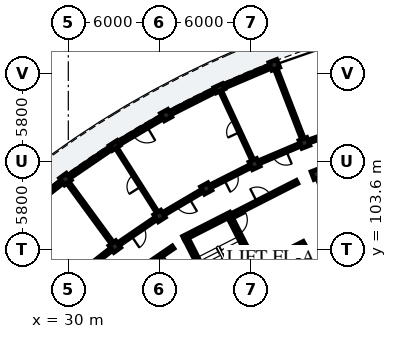
"""IFC4 building model, lengths in metres.
Left out: names, types, materials, properties, quantities, classifications, styles, units other than length and angle.
Written with IfcOpenShell. Run it as: python <this file> out.ifc"""

import sys

from ifc_helpers import new_model, si_unit, direction, frame, frame_2d, origin, origin_2d, place, context, subcontext, project, spatial, rectangle, extrude, element, fill, save


model = new_model("IFC4")
c1 = context("Model", 3, precision=1e-05, world=origin(), true_north=direction((0.0, 1.0)))
c2 = subcontext(c1, "Body", "Model", "MODEL_VIEW")
j1 = project(units=[si_unit("LENGTHUNIT", "METRE"), si_unit("PLANEANGLEUNIT", "RADIAN")], contexts=[c1])
p1 = place(None, origin())
s1 = spatial("IfcSite", under=j1, at=p1, CompositionType="ELEMENT")
p2 = place(p1, origin())
s2 = spatial("IfcBuilding", under=s1, at=p2, CompositionType="ELEMENT")
p3 = place(p2, frame((0.0, 0.0, 22.28)))
s3 = spatial("IfcBuildingStorey", under=s2, at=p3, CompositionType="ELEMENT", Elevation=22.28)
p4 = place(p3, frame((37.773, 104.296, 0.0), z_axis=(0.0, 0.0, 1.0), x_axis=(0.453992276384, -0.891005618941, 0.0)))
e1 = element("IfcWall", 1, at=p4, inside=s3, PredefinedType="SHEAR", context=c2, shape_type="SweptSolid", body=[
    extrude(rectangle(XDim=6.6, YDim=0.28, at=frame_2d((3.3, 0.0))), origin(), (0.0, 0.0, 1.0), 3.11),
])
p5 = place(p3, frame((37.585, 104.357, 0.0), z_axis=(0.0, 0.0, 1.0), x_axis=(0.891020222667, 0.453963613958, 0.0)))
e2 = element("IfcWall", 2, at=p5, inside=s3, PredefinedType="SHEAR", context=c2, shape_type="SweptSolid", body=[
    extrude(rectangle(XDim=3.48, YDim=0.28, at=frame_2d((1.74, 0.0))), origin(), (0.0, 0.0, 1.0), 3.11),
])
p6 = place(p3, frame((40.625, 105.748, 0.0), z_axis=(0.0, 0.0, 1.0), x_axis=(0.453992276384, -0.891005618941, 0.0)))
e3 = element("IfcWall", 3, at=p6, inside=s3, PredefinedType="SHEAR", context=c2, shape_type="SweptSolid", body=[
    extrude(rectangle(XDim=6.6, YDim=0.28, at=frame_2d((3.3, 0.0))), origin(), (0.0, 0.0, 1.0), 3.11),
])
p7 = place(p6, frame((0.22, 0.0, 0.0)))
e4 = element("IfcOpeningElement", 4, at=p7, cuts=e3, PredefinedType="OPENING", context=c2, shape_type="SweptSolid", body=[
    extrude(rectangle(XDim=1.05, YDim=2.15, at=frame_2d((0.525, 1.075))), frame((0.0, 0.15, 0.0), z_axis=(0.0, -1.0, 0.0), x_axis=(1.0, 0.0, 0.0)), (0.0, 0.0, 1.0), 0.3),
])
p8 = place(p3, frame((42.597, 102.561, 0.0), z_axis=(0.0, 0.0, 1.0), x_axis=(0.891001200497, 0.454000947921, 0.0)))
e5 = element("IfcWall", 5, at=p8, inside=s3, PredefinedType="SHEAR", context=c2, shape_type="SweptSolid", body=[
    extrude(rectangle(XDim=3.26, YDim=0.23, at=frame_2d((1.63, 0.0))), origin(), (0.0, 0.0, 1.0), 3.11),
])
p9 = place(p8, frame((0.9, 0.0, 0.0)))
e6 = element("IfcOpeningElement", 6, at=p9, cuts=e5, PredefinedType="OPENING", context=c2, shape_type="SweptSolid", body=[
    extrude(rectangle(XDim=1.1, YDim=2.15, at=frame_2d((0.55, 1.075))), frame((0.0, 0.125, 0.0), z_axis=(0.0, -1.0, 0.0), x_axis=(1.0, 0.0, 0.0)), (0.0, 0.0, 1.0), 0.25),
])
p10 = place(p3, frame((45.451, 103.886, 0.0), z_axis=(0.0, 0.0, 1.0), x_axis=(0.454000278178, -0.891001541758, 0.0)))
e7 = element("IfcWall", 7, at=p10, inside=s3, PredefinedType="SHEAR", context=c2, shape_type="SweptSolid", body=[
    extrude(rectangle(XDim=2.7, YDim=0.23, at=frame_2d((1.35, 0.0))), origin(), (0.0, 0.0, 1.0), 3.11),
])
for number, where, z_axis, x_axis in (
    (8, (46.325, 108.57, 0.0), (0.0, 0.0, 1.0), (-0.36, 0.933, 0.0)),
    (9, (45.532, 110.622, 0.0), (0.0, 0.0, 1.0), (-0.36, 0.933, 0.0)),
    (10, (43.552, 115.753, 0.0), (0.0, 0.0, 1.0), (-0.36, 0.933, 0.0)),
    (11, (42.252, 109.23, 0.0), (0.0, 0.0, 1.0), (-0.421, 0.907, 0.0)),
):
    element("IfcColumn", number, at=place(p3, frame(where, z_axis=z_axis, x_axis=x_axis)), inside=s3, PredefinedType="COLUMN", context=c2, shape_type="SweptSolid", body=[
        extrude(rectangle(XDim=0.55, YDim=0.55, at=origin_2d()), origin(), (0.0, 0.0, 1.0), 3.11),
    ])
p11 = place(p3, frame((39.938, 114.219, 0.0), z_axis=(0.0, 0.0, 1.0), x_axis=(-0.420859924104, 0.907125638643, 0.0)))
e12 = element("IfcColumn", 12, at=p11, inside=s3, PredefinedType="PILASTER", context=c2, shape_type="SweptSolid", body=[
    extrude(rectangle(XDim=0.38, YDim=0.62, at=origin_2d()), origin(), (0.0, 0.0, 1.0), 3.11),
])
for number, where, z_axis, x_axis in (
    (13, (39.072, 107.625, 0.0), (0.0, 0.0, 1.0), (-0.48, 0.877, 0.0)),
    (14, (36.433, 112.451, 0.0), (0.0, 0.0, 1.0), (-0.48, 0.877, 0.0)),
    (15, (36.003, 105.813, 0.0), (0.0, 0.0, 1.0), (-0.536, 0.844, 0.0)),
):
    element("IfcColumn", number, at=place(p3, frame(where, z_axis=z_axis, x_axis=x_axis)), inside=s3, PredefinedType="COLUMN", context=c2, shape_type="SweptSolid", body=[
        extrude(rectangle(XDim=0.55, YDim=0.55, at=origin_2d()), origin(), (0.0, 0.0, 1.0), 3.11),
    ])
p12 = place(p3, frame((33.052, 110.455, 0.0), z_axis=(0.0, 0.0, 1.0), x_axis=(-0.536481603385, 0.843912015099, 0.0)))
e16 = element("IfcColumn", 16, at=p12, inside=s3, PredefinedType="PILASTER", context=c2, shape_type="SweptSolid", body=[
    extrude(rectangle(XDim=0.38, YDim=0.62, at=origin_2d()), origin(), (0.0, 0.0, 1.0), 3.11),
])
for number, where, z_axis, x_axis in (
    (17, (33.061, 103.804, 0.0), (0.0, 0.0, 1.0), (-0.591, 0.807, 0.0)),
    (18, (29.811, 108.241, 0.0), (0.0, 0.0, 1.0), (-0.591, 0.807, 0.0)),
):
    element("IfcColumn", number, at=place(p3, frame(where, z_axis=z_axis, x_axis=x_axis)), inside=s3, PredefinedType="COLUMN", context=c2, shape_type="SweptSolid", body=[
        extrude(rectangle(XDim=0.55, YDim=0.55, at=origin_2d()), origin(), (0.0, 0.0, 1.0), 3.11),
    ])
p13 = place(p3, frame((43.326, 115.657, 0.0), z_axis=(0.0, 0.0, 1.0), x_axis=(-0.920502438884, -0.390736816807, 0.0)))
e19 = element("IfcWall", 19, at=p13, inside=s3, PredefinedType="SOLIDWALL", context=c2, shape_type="SweptSolid", body=[
    extrude(rectangle(XDim=3.521, YDim=0.245, at=frame_2d((1.76, 0.0))), origin(), (0.0, 0.0, 1.0), 2.355),
])
p14 = place(p13, frame((1.02, 0.0, 0.55)))
e20 = element("IfcOpeningElement", 20, at=p14, cuts=e19, PredefinedType="OPENING", context=c2, shape_type="SweptSolid", body=[
    extrude(rectangle(XDim=1.48, YDim=1.62, at=frame_2d((0.74, 0.81))), frame((0.0, 0.133, 0.0), z_axis=(0.0, -1.0, 0.0), x_axis=(1.0, 0.0, 0.0)), (0.0, 0.0, 1.0), 0.265),
])
p15 = place(p3, frame((39.795, 114.147, 0.0), z_axis=(0.0, 0.0, 1.0), x_axis=(-0.892756700232, -0.450539092855, 0.0)))
e21 = element("IfcWall", 21, at=p15, inside=s3, PredefinedType="SOLIDWALL", context=c2, shape_type="SweptSolid", body=[
    extrude(rectangle(XDim=3.521, YDim=0.245, at=frame_2d((1.76, 0.0))), origin(), (0.0, 0.0, 1.0), 2.355),
])
p16 = place(p15, frame((1.16, 0.0, 0.55)))
e22 = element("IfcOpeningElement", 22, at=p16, cuts=e21, PredefinedType="OPENING", context=c2, shape_type="SweptSolid", body=[
    extrude(rectangle(XDim=1.2, YDim=1.51, at=frame_2d((0.6, 0.755))), frame((0.0, 0.133, 0.0), z_axis=(0.0, -1.0, 0.0), x_axis=(1.0, 0.0, 0.0)), (0.0, 0.0, 1.0), 0.265),
])
p17 = place(p3, frame((36.222, 112.326, 0.0), z_axis=(0.0, 0.0, 1.0), x_axis=(-0.861154218161, -0.50834379365, 0.0)))
e23 = element("IfcWall", 23, at=p17, inside=s3, PredefinedType="SOLIDWALL", context=c2, shape_type="SweptSolid", body=[
    extrude(rectangle(XDim=3.521, YDim=0.245, at=frame_2d((1.76, 0.0))), origin(), (0.0, 0.0, 1.0), 2.355),
])
p18 = place(p17, frame((1.22, 0.0, 0.0)))
e24 = element("IfcOpeningElement", 24, at=p18, cuts=e23, PredefinedType="OPENING", context=c2, shape_type="SweptSolid", body=[
    extrude(rectangle(XDim=1.08, YDim=2.15, at=frame_2d((0.54, 1.075))), frame((0.0, 0.133, 0.0), z_axis=(0.0, -1.0, 0.0), x_axis=(1.0, 0.0, 0.0)), (0.0, 0.0, 1.0), 0.265),
])
p19 = place(p3, frame((32.92, 110.365, 0.0), z_axis=(0.0, 0.0, 1.0), x_axis=(-0.825745840472, -0.56404238045, 0.0)))
e25 = element("IfcWall", 25, at=p19, inside=s3, PredefinedType="SOLIDWALL", context=c2, shape_type="SweptSolid", body=[
    extrude(rectangle(XDim=3.521, YDim=0.245, at=frame_2d((1.76, 0.0))), origin(), (0.0, 0.0, 1.0), 2.355),
])
p20 = place(p19, frame((1.04, 0.0, 0.35)))
e26 = element("IfcOpeningElement", 26, at=p20, cuts=e25, PredefinedType="OPENING", context=c2, shape_type="SweptSolid", body=[
    extrude(rectangle(XDim=1.44, YDim=1.66, at=frame_2d((0.72, 0.83))), frame((0.0, 0.133, 0.0), z_axis=(0.0, -1.0, 0.0), x_axis=(1.0, 0.0, 0.0)), (0.0, 0.0, 1.0), 0.265),
])
p21 = place(p3, frame((29.618, 108.09, 0.0), z_axis=(0.0, 0.0, 1.0), x_axis=(-0.786813798172, -0.617190446301, 0.0)))
e27 = element("IfcWall", 27, at=p21, inside=s3, PredefinedType="SOLIDWALL", context=c2, shape_type="SweptSolid", body=[
    extrude(rectangle(XDim=3.521, YDim=0.245, at=frame_2d((1.76, 0.0))), origin(), (0.0, 0.0, 1.0), 2.355),
])
p22 = place(p21, frame((0.98, 0.0, 0.55)))
e28 = element("IfcOpeningElement", 28, at=p22, cuts=e27, PredefinedType="OPENING", context=c2, shape_type="SweptSolid", body=[
    extrude(rectangle(XDim=1.56, YDim=1.51, at=frame_2d((0.78, 0.755))), frame((0.0, 0.133, 0.0), z_axis=(0.0, -1.0, 0.0), x_axis=(1.0, 0.0, 0.0)), (0.0, 0.0, 1.0), 0.265),
])
p23 = place(p3, frame((40.682, 105.834, 0.0), z_axis=(0.0, 0.0, 1.0), x_axis=(0.891003372311, 0.453996685595, 0.0)))
e29 = element("IfcWall", 29, at=p23, inside=s3, PredefinedType="PARTITIONING", context=c2, shape_type="SweptSolid", body=[
    extrude(rectangle(XDim=4.9, YDim=0.22, at=frame_2d((2.45, 0.0))), origin(), (0.0, 0.0, 1.0), 2.34),
])
p24 = place(p23, frame((1.95, 0.0, 0.0)))
e30 = element("IfcOpeningElement", 30, at=p24, cuts=e29, PredefinedType="OPENING", context=c2, shape_type="SweptSolid", body=[
    extrude(rectangle(XDim=1.0, YDim=2.15, at=frame_2d((0.5, 1.075))), frame((0.0, 0.12, 0.0), z_axis=(0.0, -1.0, 0.0), x_axis=(1.0, 0.0, 0.0)), (0.0, 0.0, 1.0), 0.24),
])
p25 = place(p3, frame((48.566, 111.68, 0.0), z_axis=(0.0, 0.0, 1.0), x_axis=(-0.944253820929, -0.329218349522, 0.0)))
e31 = element("IfcWall", 31, at=p25, inside=s3, PredefinedType="PARTITIONING", context=c2, shape_type="SweptSolid", body=[
    extrude(rectangle(XDim=2.863, YDim=0.205, at=frame_2d((1.432, 0.0))), origin(), (0.0, 0.0, 1.0), 2.37),
])
p26 = place(p25, frame((0.947, 0.0, 0.0)))
e32 = element("IfcOpeningElement", 32, at=p26, cuts=e31, PredefinedType="OPENING", context=c2, shape_type="SweptSolid", body=[
    extrude(rectangle(XDim=0.97, YDim=2.15, at=frame_2d((0.485, 1.075))), frame((0.0, 0.113, 0.0), z_axis=(0.0, -1.0, 0.0), x_axis=(1.0, 0.0, 0.0)), (0.0, 0.0, 1.0), 0.225),
])
p27 = place(p3, frame((45.388, 110.996, 0.0), z_axis=(0.0, 0.0, 1.0), x_axis=(-0.360186633854, 0.932880264982, 0.0)))
e33 = element("IfcWall", 33, at=p27, inside=s3, PredefinedType="PARTITIONING", context=c2, shape_type="SweptSolid", body=[
    extrude(rectangle(XDim=4.7, YDim=0.185, at=frame_2d((2.35, 0.0))), origin(), (0.0, 0.0, 1.0), 2.37),
])
p28 = place(p3, frame((45.21, 110.486, 0.0), z_axis=(0.0, 0.0, 1.0), x_axis=(-0.920511160294, -0.390716270168, 0.0)))
e34 = element("IfcWall", 34, at=p28, inside=s3, PredefinedType="PARTITIONING", context=c2, shape_type="SweptSolid", body=[
    extrude(rectangle(XDim=2.863, YDim=0.205, at=frame_2d((1.432, 0.0))), origin(), (0.0, 0.0, 1.0), 2.37),
])
p29 = place(p28, frame((0.957, 0.0, 0.0)))
e35 = element("IfcOpeningElement", 35, at=p29, cuts=e34, PredefinedType="OPENING", context=c2, shape_type="SweptSolid", body=[
    extrude(rectangle(XDim=0.95, YDim=2.13, at=frame_2d((0.475, 1.065))), frame((0.0, 0.113, 0.0), z_axis=(0.0, -1.0, 0.0), x_axis=(1.0, 0.0, 0.0)), (0.0, 0.0, 1.0), 0.225),
])
p30 = place(p3, frame((42.084, 109.593, 0.0), z_axis=(0.0, 0.0, 1.0), x_axis=(-0.420862519045, 0.907124434718, 0.0)))
e36 = element("IfcWall", 36, at=p30, inside=s3, PredefinedType="PLUMBINGWALL", context=c2, shape_type="SweptSolid", body=[
    extrude(rectangle(XDim=4.7, YDim=0.14, at=frame_2d((2.35, 0.0))), origin(), (0.0, 0.0, 1.0), 2.37),
])
p31 = place(p30, frame((1.92, 0.0, 0.0)))
e37 = element("IfcOpeningElement", 37, at=p31, cuts=e36, PredefinedType="OPENING", context=c2, shape_type="SweptSolid", body=[
    extrude(rectangle(XDim=0.86, YDim=2.06, at=frame_2d((0.43, 1.03))), frame((0.0, 0.08, 0.0), z_axis=(0.0, -1.0, 0.0), x_axis=(1.0, 0.0, 0.0)), (0.0, 0.0, 1.0), 0.16),
])
p32 = place(p3, frame((41.94, 109.073, 0.0), z_axis=(0.0, 0.0, 1.0), x_axis=(-0.89273239336, -0.450587254419, 0.0)))
e38 = element("IfcWall", 38, at=p32, inside=s3, PredefinedType="PARTITIONING", context=c2, shape_type="SweptSolid", body=[
    extrude(rectangle(XDim=2.863, YDim=0.205, at=frame_2d((1.432, 0.0))), origin(), (0.0, 0.0, 1.0), 2.37),
])
p33 = place(p32, frame((0.967, 0.0, 0.0)))
e39 = element("IfcOpeningElement", 39, at=p33, cuts=e38, PredefinedType="OPENING", context=c2, shape_type="SweptSolid", body=[
    extrude(rectangle(XDim=0.93, YDim=2.12, at=frame_2d((0.465, 1.06))), frame((0.0, 0.113, 0.0), z_axis=(0.0, -1.0, 0.0), x_axis=(1.0, 0.0, 0.0)), (0.0, 0.0, 1.0), 0.225),
])
p34 = place(p3, frame((38.77, 107.447, 0.0), z_axis=(0.0, 0.0, 1.0), x_axis=(-0.861113214678, -0.508413248753, 0.0)))
e40 = element("IfcWall", 40, at=p34, inside=s3, PredefinedType="PARTITIONING", context=c2, shape_type="SweptSolid", body=[
    extrude(rectangle(XDim=2.863, YDim=0.205, at=frame_2d((1.432, 0.0))), origin(), (0.0, 0.0, 1.0), 2.37),
])
p35 = place(p34, frame((0.937, 0.0, 0.0)))
e41 = element("IfcOpeningElement", 41, at=p35, cuts=e40, PredefinedType="OPENING", context=c2, shape_type="SweptSolid", body=[
    extrude(rectangle(XDim=0.99, YDim=2.16, at=frame_2d((0.495, 1.08))), frame((0.0, 0.113, 0.0), z_axis=(0.0, -1.0, 0.0), x_axis=(1.0, 0.0, 0.0)), (0.0, 0.0, 1.0), 0.225),
])
p36 = place(p3, frame((35.789, 106.151, 0.0), z_axis=(0.0, 0.0, 1.0), x_axis=(-0.536492262982, 0.843905238614, 0.0)))
e42 = element("IfcWall", 42, at=p36, inside=s3, PredefinedType="PARTITIONING", context=c2, shape_type="SweptSolid", body=[
    extrude(rectangle(XDim=4.7, YDim=0.125, at=frame_2d((2.35, 0.0))), origin(), (0.0, 0.0, 1.0), 2.37),
])
p37 = place(p36, frame((1.895, 0.0, 0.0)))
e43 = element("IfcOpeningElement", 43, at=p37, cuts=e42, PredefinedType="OPENING", context=c2, shape_type="SweptSolid", body=[
    extrude(rectangle(XDim=0.91, YDim=2.1, at=frame_2d((0.455, 1.05))), frame((0.0, 0.073, 0.0), z_axis=(0.0, -1.0, 0.0), x_axis=(1.0, 0.0, 0.0)), (0.0, 0.0, 1.0), 0.145),
])
p38 = place(p3, frame((35.714, 105.616, 0.0), z_axis=(0.0, 0.0, 1.0), x_axis=(-0.825779671787, -0.563992848947, 0.0)))
e44 = element("IfcWall", 44, at=p38, inside=s3, PredefinedType="PARTITIONING", context=c2, shape_type="SweptSolid", body=[
    extrude(rectangle(XDim=2.863, YDim=0.205, at=frame_2d((1.432, 0.0))), origin(), (0.0, 0.0, 1.0), 2.37),
])
p39 = place(p38, frame((0.947, 0.0, 0.0)))
e45 = element("IfcOpeningElement", 45, at=p39, cuts=e44, PredefinedType="OPENING", context=c2, shape_type="SweptSolid", body=[
    extrude(rectangle(XDim=0.97, YDim=2.15, at=frame_2d((0.485, 1.075))), frame((0.0, 0.113, 0.0), z_axis=(0.0, -1.0, 0.0), x_axis=(1.0, 0.0, 0.0)), (0.0, 0.0, 1.0), 0.225),
])
p40 = place(p3, frame((36.895, 103.76, 0.0), z_axis=(0.0, 0.0, 1.0), x_axis=(-0.825752009056, -0.56403334967, 0.0)))
e46 = element("IfcWall", 46, at=p40, inside=s3, PredefinedType="PARTITIONING", context=c2, shape_type="SweptSolid", body=[
    extrude(rectangle(XDim=2.718, YDim=0.205, at=frame_2d((1.359, 0.0))), origin(), (0.0, 0.0, 1.0), 2.37),
])
p41 = place(p40, frame((0.874, 0.0, 0.0)))
e47 = element("IfcOpeningElement", 47, at=p41, cuts=e46, PredefinedType="OPENING", context=c2, shape_type="SweptSolid", body=[
    extrude(rectangle(XDim=0.97, YDim=2.15, at=frame_2d((0.485, 1.075))), frame((0.0, 0.113, 0.0), z_axis=(0.0, -1.0, 0.0), x_axis=(1.0, 0.0, 0.0)), (0.0, 0.0, 1.0), 0.225),
])
p42 = place(p3, frame((32.824, 104.126, 0.0), z_axis=(0.0, 0.0, 1.0), x_axis=(-0.590910940129, 0.806736797745, 0.0)))
e48 = element("IfcWall", 48, at=p42, inside=s3, PredefinedType="PARTITIONING", context=c2, shape_type="SweptSolid", body=[
    extrude(rectangle(XDim=4.7, YDim=0.185, at=frame_2d((2.35, 0.0))), origin(), (0.0, 0.0, 1.0), 2.37),
])
p43 = place(p3, frame((32.785, 103.588, 0.0), z_axis=(0.0, 0.0, 1.0), x_axis=(-0.786806323554, -0.617199975061, 0.0)))
e49 = element("IfcWall", 49, at=p43, inside=s3, PredefinedType="PARTITIONING", context=c2, shape_type="SweptSolid", body=[
    extrude(rectangle(XDim=2.863, YDim=0.205, at=frame_2d((1.432, 0.0))), origin(), (0.0, 0.0, 1.0), 2.37),
])
p44 = place(p43, frame((0.957, 0.0, 0.0)))
e50 = element("IfcOpeningElement", 50, at=p44, cuts=e49, PredefinedType="OPENING", context=c2, shape_type="SweptSolid", body=[
    extrude(rectangle(XDim=0.95, YDim=2.13, at=frame_2d((0.475, 1.065))), frame((0.0, 0.113, 0.0), z_axis=(0.0, -1.0, 0.0), x_axis=(1.0, 0.0, 0.0)), (0.0, 0.0, 1.0), 0.225),
])
p45 = place(p14, origin())
e51 = element("IfcWindow", 51, at=p45, inside=s3, PartitioningType="SINGLE_PANEL", PredefinedType="WINDOW", context=c2, shape_type="SweptSolid", body=[
    extrude(rectangle(XDim=1.48, YDim=1.62, at=frame_2d((0.74, 0.81))), frame((0.0, 0.03, 0.0), z_axis=(0.0, -1.0, 0.0), x_axis=(1.0, 0.0, 0.0)), (0.0, 0.0, 1.0), 0.06),
])
fill(e20, e51)
p46 = place(p16, origin())
e52 = element("IfcWindow", 52, at=p46, inside=s3, PartitioningType="SINGLE_PANEL", PredefinedType="WINDOW", context=c2, shape_type="SweptSolid", body=[
    extrude(rectangle(XDim=1.2, YDim=1.51, at=frame_2d((0.6, 0.755))), frame((0.0, 0.03, 0.0), z_axis=(0.0, -1.0, 0.0), x_axis=(1.0, 0.0, 0.0)), (0.0, 0.0, 1.0), 0.06),
])
fill(e22, e52)
p47 = place(p18, origin())
e53 = element("IfcDoor", 53, at=p47, inside=s3, OperationType="SINGLE_SWING_LEFT", PredefinedType="DOOR", context=c2, shape_type="SweptSolid", body=[
    extrude(rectangle(XDim=1.08, YDim=2.15, at=frame_2d((0.54, 1.075))), frame((0.0, 0.025, 0.0), z_axis=(0.0, -1.0, 0.0), x_axis=(1.0, 0.0, 0.0)), (0.0, 0.0, 1.0), 0.05),
])
fill(e24, e53)
p48 = place(p20, origin())
e54 = element("IfcWindow", 54, at=p48, inside=s3, PartitioningType="SINGLE_PANEL", PredefinedType="WINDOW", context=c2, shape_type="SweptSolid", body=[
    extrude(rectangle(XDim=1.44, YDim=1.66, at=frame_2d((0.72, 0.83))), frame((0.0, 0.03, 0.0), z_axis=(0.0, -1.0, 0.0), x_axis=(1.0, 0.0, 0.0)), (0.0, 0.0, 1.0), 0.06),
])
fill(e26, e54)
p49 = place(p7, origin())
e55 = element("IfcDoor", 55, at=p49, inside=s3, OperationType="SINGLE_SWING_LEFT", PredefinedType="DOOR", context=c2, shape_type="SweptSolid", body=[
    extrude(rectangle(XDim=1.05, YDim=2.15, at=frame_2d((0.525, 1.075))), frame((0.0, 0.025, 0.0), z_axis=(0.0, -1.0, 0.0), x_axis=(1.0, 0.0, 0.0)), (0.0, 0.0, 1.0), 0.05),
])
fill(e4, e55)
p50 = place(p9, origin())
e56 = element("IfcDoor", 56, at=p50, inside=s3, OperationType="DOUBLE_DOOR_SLIDING", PredefinedType="DOOR", context=c2, shape_type="SweptSolid", body=[
    extrude(rectangle(XDim=1.1, YDim=2.15, at=frame_2d((0.55, 1.075))), frame((0.0, 0.025, 0.0), z_axis=(0.0, -1.0, 0.0), x_axis=(1.0, 0.0, 0.0)), (0.0, 0.0, 1.0), 0.05),
])
fill(e6, e56)
p51 = place(p24, origin())
e57 = element("IfcDoor", 57, at=p51, inside=s3, OperationType="SINGLE_SWING_LEFT", PredefinedType="DOOR", context=c2, shape_type="SweptSolid", body=[
    extrude(rectangle(XDim=1.0, YDim=2.15, at=frame_2d((0.5, 1.075))), frame((0.0, 0.025, 0.0), z_axis=(0.0, -1.0, 0.0), x_axis=(1.0, 0.0, 0.0)), (0.0, 0.0, 1.0), 0.05),
])
fill(e30, e57)
p52 = place(p29, origin())
e58 = element("IfcDoor", 58, at=p52, inside=s3, OperationType="SINGLE_SWING_LEFT", PredefinedType="DOOR", context=c2, shape_type="SweptSolid", body=[
    extrude(rectangle(XDim=0.95, YDim=2.13, at=frame_2d((0.475, 1.065))), frame((0.0, 0.025, 0.0), z_axis=(0.0, -1.0, 0.0), x_axis=(1.0, 0.0, 0.0)), (0.0, 0.0, 1.0), 0.05),
])
fill(e35, e58)
p53 = place(p31, origin())
e59 = element("IfcDoor", 59, at=p53, inside=s3, OperationType="SINGLE_SWING_LEFT", PredefinedType="DOOR", context=c2, shape_type="SweptSolid", body=[
    extrude(rectangle(XDim=0.86, YDim=2.06, at=frame_2d((0.43, 1.03))), frame((0.0, 0.025, 0.0), z_axis=(0.0, -1.0, 0.0), x_axis=(1.0, 0.0, 0.0)), (0.0, 0.0, 1.0), 0.05),
])
fill(e37, e59)
p54 = place(p33, origin())
e60 = element("IfcDoor", 60, at=p54, inside=s3, OperationType="SINGLE_SWING_RIGHT", PredefinedType="DOOR", context=c2, shape_type="SweptSolid", body=[
    extrude(rectangle(XDim=0.93, YDim=2.12, at=frame_2d((0.465, 1.06))), frame((0.0, 0.025, 0.0), z_axis=(0.0, -1.0, 0.0), x_axis=(1.0, 0.0, 0.0)), (0.0, 0.0, 1.0), 0.05),
])
fill(e39, e60)
p55 = place(p35, origin())
e61 = element("IfcDoor", 61, at=p55, inside=s3, OperationType="SINGLE_SWING_LEFT", PredefinedType="DOOR", context=c2, shape_type="SweptSolid", body=[
    extrude(rectangle(XDim=0.99, YDim=2.16, at=frame_2d((0.495, 1.08))), frame((0.0, 0.025, 0.0), z_axis=(0.0, -1.0, 0.0), x_axis=(1.0, 0.0, 0.0)), (0.0, 0.0, 1.0), 0.05),
])
fill(e41, e61)
p56 = place(p37, origin())
e62 = element("IfcDoor", 62, at=p56, inside=s3, OperationType="SINGLE_SWING_LEFT", PredefinedType="DOOR", context=c2, shape_type="SweptSolid", body=[
    extrude(rectangle(XDim=0.91, YDim=2.1, at=frame_2d((0.455, 1.05))), frame((0.0, 0.025, 0.0), z_axis=(0.0, -1.0, 0.0), x_axis=(1.0, 0.0, 0.0)), (0.0, 0.0, 1.0), 0.05),
])
fill(e43, e62)
p57 = place(p39, origin())
e63 = element("IfcDoor", 63, at=p57, inside=s3, OperationType="SINGLE_SWING_RIGHT", PredefinedType="DOOR", context=c2, shape_type="SweptSolid", body=[
    extrude(rectangle(XDim=0.97, YDim=2.15, at=frame_2d((0.485, 1.075))), frame((0.0, 0.025, 0.0), z_axis=(0.0, -1.0, 0.0), x_axis=(1.0, 0.0, 0.0)), (0.0, 0.0, 1.0), 0.05),
])
fill(e45, e63)
p58 = place(p41, origin())
e64 = element("IfcDoor", 64, at=p58, inside=s3, OperationType="SINGLE_SWING_LEFT", PredefinedType="DOOR", context=c2, shape_type="SweptSolid", body=[
    extrude(rectangle(XDim=0.97, YDim=2.15, at=frame_2d((0.485, 1.075))), frame((0.0, 0.025, 0.0), z_axis=(0.0, -1.0, 0.0), x_axis=(1.0, 0.0, 0.0)), (0.0, 0.0, 1.0), 0.05),
])
fill(e47, e64)
p59 = place(p44, origin())
e65 = element("IfcDoor", 65, at=p59, inside=s3, OperationType="SINGLE_SWING_LEFT", PredefinedType="DOOR", context=c2, shape_type="SweptSolid", body=[
    extrude(rectangle(XDim=0.95, YDim=2.13, at=frame_2d((0.475, 1.065))), frame((0.0, 0.025, 0.0), z_axis=(0.0, -1.0, 0.0), x_axis=(1.0, 0.0, 0.0)), (0.0, 0.0, 1.0), 0.05),
])
fill(e50, e65)
save(model, sys.argv[1])
